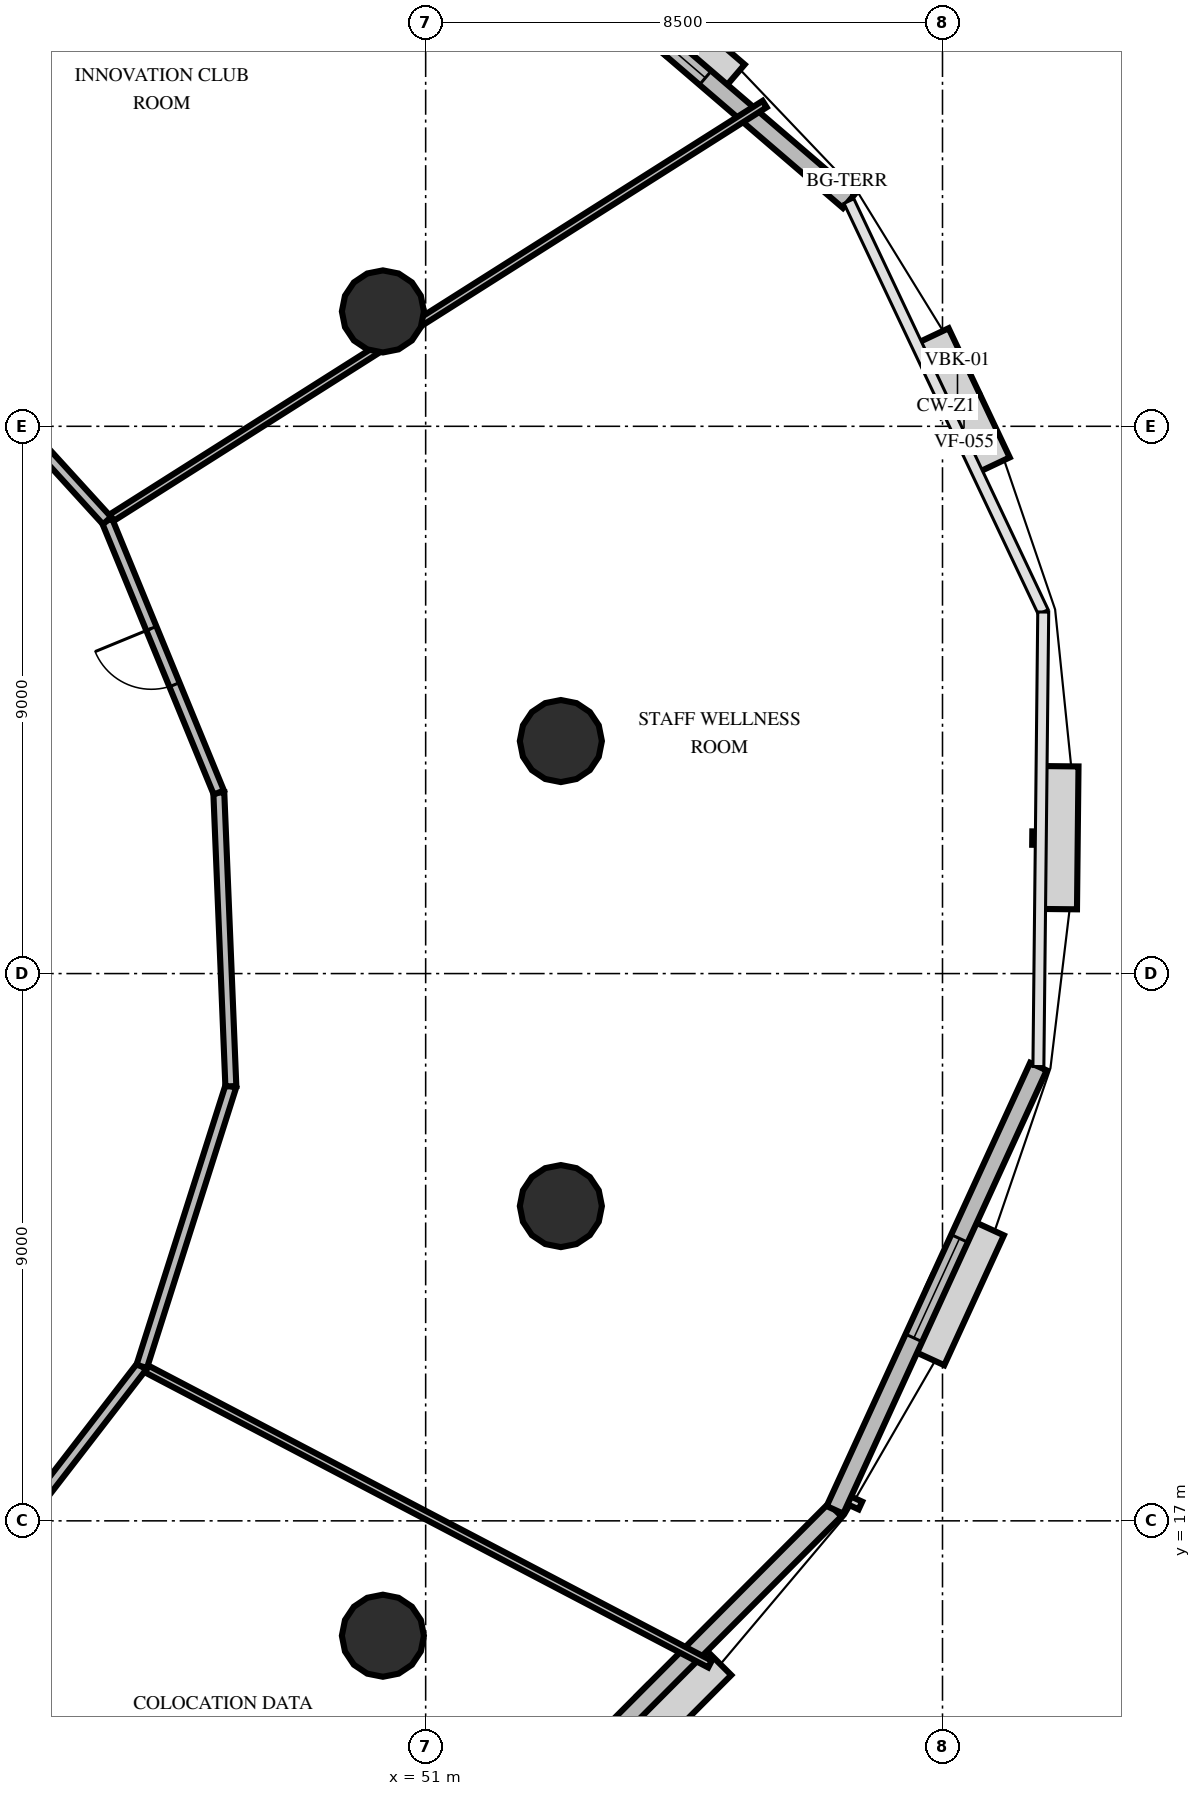
"""IFC4 building model, lengths in metres.
Left out: names, types, materials, properties, quantities, classifications, styles, units other than length and angle.
Written with IfcOpenShell. Run it as: python <this file> out.ifc"""

import sys

from ifc_helpers import new_model, si_unit, direction, frame, frame_2d, origin, origin_2d, place, context, subcontext, project, spatial, rectangle, circle, extrude, element, fill, save


model = new_model("IFC4")
c1 = context("Model", 3, precision=1e-05, world=origin(), true_north=direction((0.0, 1.0)))
c2 = subcontext(c1, "Body", "Model", "MODEL_VIEW")
j1 = project(units=[si_unit("LENGTHUNIT", "METRE"), si_unit("PLANEANGLEUNIT", "RADIAN")], contexts=[c1])
p1 = place(None, origin())
s1 = spatial("IfcSite", under=j1, at=p1, CompositionType="ELEMENT")
p2 = place(p1, origin())
s2 = spatial("IfcBuilding", under=s1, at=p2, CompositionType="ELEMENT")
p3 = place(p2, frame((0.0, 0.0, 84.6)))
s3 = spatial("IfcBuildingStorey", under=s2, at=p3, CompositionType="ELEMENT", Elevation=84.6)
for number, where, z_axis, x_axis in (
    (1, (53.223, 29.824, 0.0), (0.0, 0.0, 1.0), (1.0, 0.0, 0.0)),
    (2, (50.297, 36.889, 0.0), (0.0, 0.0, 1.0), (1.0, 0.0, 0.0)),
    (3, (50.297, 15.111, 0.0), (0.0, 0.0, 1.0), (1.0, 0.0, 0.0)),
    (4, (53.223, 22.176, 0.0), (0.0, 0.0, 1.0), (1.0, 0.0, 0.0)),
):
    element("IfcColumn", number, at=place(p3, frame(where, z_axis=z_axis, x_axis=x_axis)), inside=s3, PredefinedType="COLUMN", context=c2, shape_type="SweptSolid", body=[
        extrude(circle(Radius=0.675, at=origin_2d()), origin(), (0.0, 0.0, 1.0), 4.2),
    ])
p4 = place(p3, frame((57.961, 38.704, 0.0), z_axis=(0.0, 0.0, 1.0), x_axis=(-0.758684823953, 0.651457855815, 0.0)))
e5 = element("IfcWall", 5, at=p4, inside=s3, PredefinedType="SOLIDWALL", context=c2, shape_type="SweptSolid", body=[
    extrude(rectangle(XDim=8.021, YDim=0.3, at=frame_2d((4.011, 0.0))), origin(), (0.0, 0.0, 1.0), 2.96),
])
p5 = place(p4, frame((3.111, 0.0, 0.8)))
e6 = element("IfcOpeningElement", 6, at=p5, cuts=e5, PredefinedType="OPENING", context=c2, shape_type="SweptSolid", body=[
    extrude(rectangle(XDim=1.8, YDim=1.95, at=frame_2d((0.9, 0.975))), frame((0.0, 0.16, 0.0), z_axis=(0.0, -1.0, 0.0), x_axis=(1.0, 0.0, 0.0)), (0.0, 0.0, 1.0), 0.32),
])
p6 = place(p3, frame((51.524, 10.954, 0.0), z_axis=(0.0, 0.0, 1.0), x_axis=(0.7060369774, 0.708174968877, 0.0)))
e7 = element("IfcWall", 7, at=p6, inside=s3, PredefinedType="SOLIDWALL", context=c2, shape_type="SweptSolid", body=[
    extrude(rectangle(XDim=8.793, YDim=0.3, at=frame_2d((4.396, 0.0))), origin(), (0.0, 0.0, 1.0), 2.96),
])
p7 = place(p6, frame((1.79, 0.0, 0.8)))
e8 = element("IfcOpeningElement", 8, at=p7, cuts=e7, PredefinedType="OPENING", context=c2, shape_type="SweptSolid", body=[
    extrude(rectangle(XDim=1.8, YDim=1.95, at=frame_2d((0.9, 0.975))), frame((0.0, 0.16, 0.0), z_axis=(0.0, -1.0, 0.0), x_axis=(1.0, 0.0, 0.0)), (0.0, 0.0, 1.0), 0.32),
])
p8 = place(p3, frame((57.732, 17.18, 0.0), z_axis=(0.0, 0.0, 1.0), x_axis=(0.417063391763, 0.908877399461, 0.0)))
e9 = element("IfcWall", 9, at=p8, inside=s3, PredefinedType="SOLIDWALL", context=c2, shape_type="SweptSolid", body=[
    extrude(rectangle(XDim=8.021, YDim=0.3, at=frame_2d((4.011, 0.0))), origin(), (0.0, 0.0, 1.0), 2.96),
])
p9 = place(p8, frame((3.111, 0.0, 0.8)))
e10 = element("IfcOpeningElement", 10, at=p9, cuts=e9, PredefinedType="OPENING", context=c2, shape_type="SweptSolid", body=[
    extrude(rectangle(XDim=1.8, YDim=1.95, at=frame_2d((0.9, 0.975))), frame((0.0, 0.16, 0.0), z_axis=(0.0, -1.0, 0.0), x_axis=(1.0, 0.0, 0.0)), (0.0, 0.0, 1.0), 0.32),
])
p10 = place(p3, frame((46.33, 19.54, 0.0), z_axis=(0.0, 0.0, 1.0), x_axis=(0.885792580472, -0.464081355348, 0.0)))
e11 = element("IfcWall", 11, at=p10, inside=s3, PredefinedType="PARTITIONING", context=c2, shape_type="SweptSolid", body=[
    extrude(rectangle(XDim=10.55, YDim=0.125, at=frame_2d((5.275, 0.0))), origin(), (0.0, 0.0, 1.0), 2.96),
])
p11 = place(p3, frame((43.377, 15.712, 0.0), z_axis=(0.0, 0.0, 1.0), x_axis=(0.610827876175, 0.791763415224, 0.0)))
e12 = element("IfcWall", 12, at=p11, inside=s3, PredefinedType="PARTITIONING", context=c2, shape_type="SweptSolid", body=[
    extrude(rectangle(XDim=4.835, YDim=0.18, at=frame_2d((2.417, 0.0))), origin(), (0.0, 0.0, 1.0), 2.96),
])
p12 = place(p11, frame((0.996, 0.0, 0.0)))
e13 = element("IfcOpeningElement", 13, at=p12, cuts=e12, PredefinedType="OPENING", context=c2, shape_type="SweptSolid", body=[
    extrude(rectangle(XDim=1.15, YDim=2.15, at=frame_2d((0.575, 1.075))), frame((0.0, 0.1, 0.0), z_axis=(0.0, -1.0, 0.0), x_axis=(1.0, 0.0, 0.0)), (0.0, 0.0, 1.0), 0.2),
])
p13 = place(p3, frame((45.76, 33.448, 0.0), z_axis=(0.0, 0.0, 1.0), x_axis=(0.844793501384, 0.535092459318, 0.0)))
e14 = element("IfcWall", 14, at=p13, inside=s3, PredefinedType="PARTITIONING", context=c2, shape_type="SweptSolid", body=[
    extrude(rectangle(XDim=12.802, YDim=0.125, at=frame_2d((6.401, 0.0))), origin(), (0.0, 0.0, 1.0), 2.96),
])
p14 = place(p3, frame((46.33, 19.54, 0.0), z_axis=(0.0, 0.0, 1.0), x_axis=(0.303214079813, 0.952922463689, 0.0)))
e15 = element("IfcWall", 15, at=p14, inside=s3, PredefinedType="PARTITIONING", context=c2, shape_type="SweptSolid", body=[
    extrude(rectangle(XDim=4.834, YDim=0.18, at=frame_2d((2.417, 0.0))), origin(), (0.0, 0.0, 1.0), 2.96),
])
p15 = place(p3, frame((47.796, 24.147, 0.0), z_axis=(0.0, 0.0, 1.0), x_axis=(-0.041006671954, 0.99915887268, 0.0)))
e16 = element("IfcWall", 16, at=p15, inside=s3, PredefinedType="PARTITIONING", context=c2, shape_type="SweptSolid", body=[
    extrude(rectangle(XDim=4.834, YDim=0.18, at=frame_2d((2.417, 0.0))), origin(), (0.0, 0.0, 1.0), 2.96),
])
p16 = place(p3, frame((47.598, 28.977, 0.0), z_axis=(0.0, 0.0, 1.0), x_axis=(-0.380272236521, 0.924874600219, 0.0)))
e17 = element("IfcWall", 17, at=p16, inside=s3, PredefinedType="PARTITIONING", context=c2, shape_type="SweptSolid", body=[
    extrude(rectangle(XDim=4.834, YDim=0.18, at=frame_2d((2.417, 0.0))), origin(), (0.0, 0.0, 1.0), 2.96),
])
p17 = place(p16, frame((1.917, 0.0, 0.0)))
e18 = element("IfcOpeningElement", 18, at=p17, cuts=e17, PredefinedType="OPENING", context=c2, shape_type="SweptSolid", body=[
    extrude(rectangle(XDim=1.0, YDim=2.15, at=frame_2d((0.5, 1.075))), frame((0.0, 0.1, 0.0), z_axis=(0.0, -1.0, 0.0), x_axis=(1.0, 0.0, 0.0)), (0.0, 0.0, 1.0), 0.2),
])
p18 = place(p3, frame((45.76, 33.448, 0.0), z_axis=(0.0, 0.0, 1.0), x_axis=(-0.673677614221, 0.739025352811, 0.0)))
e19 = element("IfcWall", 19, at=p18, inside=s3, PredefinedType="PARTITIONING", context=c2, shape_type="SweptSolid", body=[
    extrude(rectangle(XDim=4.834, YDim=0.18, at=frame_2d((2.417, 0.0))), origin(), (0.0, 0.0, 1.0), 2.96),
])
p19 = place(p18, frame((2.801, 0.0, 0.0)))
e20 = element("IfcOpeningElement", 20, at=p19, cuts=e19, PredefinedType="OPENING", context=c2, shape_type="SweptSolid", body=[
    extrude(rectangle(XDim=1.0, YDim=2.15, at=frame_2d((0.5, 1.075))), frame((0.0, 0.1, 0.0), z_axis=(0.0, -1.0, 0.0), x_axis=(1.0, 0.0, 0.0)), (0.0, 0.0, 1.0), 0.2),
])
p20 = place(p5, origin())
e21 = element("IfcWindow", 21, at=p20, inside=s3, PartitioningType="SINGLE_PANEL", PredefinedType="WINDOW", context=c2, shape_type="SweptSolid", body=[
    extrude(rectangle(XDim=1.8, YDim=1.95, at=frame_2d((0.9, 0.975))), frame((0.0, 0.03, 0.0), z_axis=(0.0, -1.0, 0.0), x_axis=(1.0, 0.0, 0.0)), (0.0, 0.0, 1.0), 0.06),
])
fill(e6, e21)
p21 = place(p9, origin())
e22 = element("IfcWindow", 22, at=p21, inside=s3, PartitioningType="SINGLE_PANEL", PredefinedType="WINDOW", context=c2, shape_type="SweptSolid", body=[
    extrude(rectangle(XDim=1.8, YDim=1.95, at=frame_2d((0.9, 0.975))), frame((0.0, 0.03, 0.0), z_axis=(0.0, -1.0, 0.0), x_axis=(1.0, 0.0, 0.0)), (0.0, 0.0, 1.0), 0.06),
])
fill(e10, e22)
p22 = place(p17, origin())
e23 = element("IfcDoor", 23, at=p22, inside=s3, OperationType="SINGLE_SWING_RIGHT", PredefinedType="DOOR", context=c2, shape_type="SweptSolid", body=[
    extrude(rectangle(XDim=1.0, YDim=2.15, at=frame_2d((0.5, 1.075))), frame((0.0, 0.025, 0.0), z_axis=(0.0, -1.0, 0.0), x_axis=(1.0, 0.0, 0.0)), (0.0, 0.0, 1.0), 0.05),
])
fill(e18, e23)
save(model, sys.argv[1])
